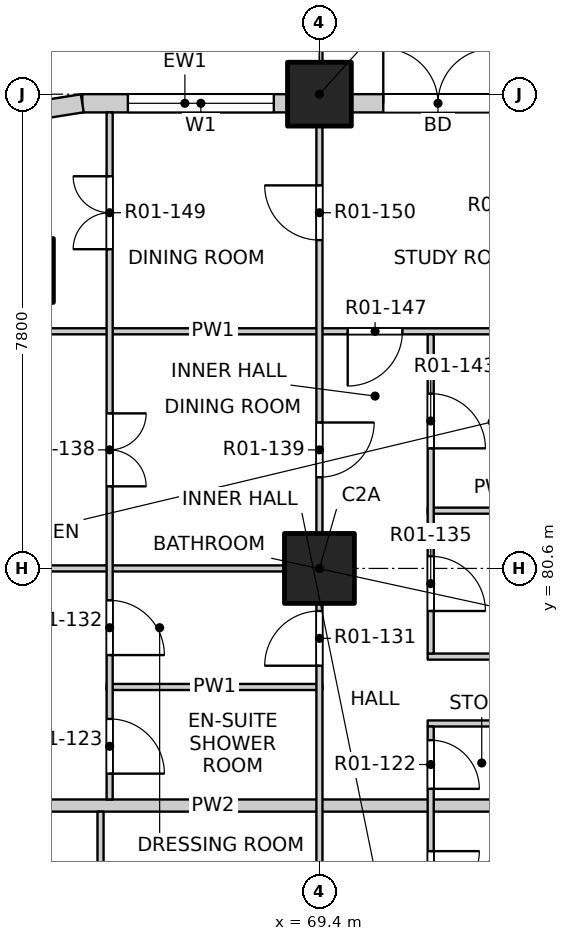
"""IFC4 building model, lengths in metres.
Left out: names, types, materials, properties, quantities, classifications, styles, units other than length and angle.
Written with IfcOpenShell. Run it as: python <this file> out.ifc"""

import sys

from ifc_helpers import new_model, si_unit, direction, frame, frame_2d, origin, origin_2d, place, context, subcontext, project, spatial, rectangle, extrude, element, fill, save


model = new_model("IFC4")
c1 = context("Model", 3, precision=1e-05, world=origin(), true_north=direction((0.0, 1.0)))
c2 = subcontext(c1, "Body", "Model", "MODEL_VIEW")
j1 = project(units=[si_unit("LENGTHUNIT", "METRE"), si_unit("PLANEANGLEUNIT", "RADIAN")], contexts=[c1])
p1 = place(None, origin())
s1 = spatial("IfcSite", under=j1, at=p1, CompositionType="ELEMENT")
p2 = place(p1, origin())
s2 = spatial("IfcBuilding", under=s1, at=p2, CompositionType="ELEMENT")
p3 = place(p2, frame((0.0, 0.0, 19.5)))
s3 = spatial("IfcBuildingStorey", under=s2, at=p3, CompositionType="ELEMENT", Elevation=19.5)
for number, where, z_axis, x_axis in (
    (1, (64.5, 85.5, -0.25), (0.0, 0.0, 1.0), (1.0, 0.0, 0.0)),
    (2, (69.4, 88.4, -0.25), (0.0, 0.0, 1.0), (1.0, 0.0, 0.0)),
):
    element("IfcColumn", number, at=place(p3, frame(where, z_axis=z_axis, x_axis=x_axis)), inside=s3, PredefinedType="COLUMN", context=c2, shape_type="SweptSolid", body=[
        extrude(rectangle(XDim=1.05, YDim=1.05, at=origin_2d()), origin(), (0.0, 0.0, 1.0), 3.4),
    ])
p4 = place(p3, frame((69.4, 80.6, -0.25), z_axis=(0.0, 0.0, 1.0), x_axis=(1.0, 0.0, 0.0)))
e3 = element("IfcColumn", 3, at=p4, inside=s3, PredefinedType="COLUMN", context=c2, shape_type="SweptSolid", body=[
    extrude(rectangle(XDim=1.15, YDim=1.15, at=origin_2d()), origin(), (0.0, 0.0, 1.0), 3.4),
])
p5 = place(p3, frame((65.5, 88.25, 0.0), z_axis=(0.0, 0.0, 1.0), x_axis=(1.0, 0.0, 0.0)))
e4 = element("IfcWall", 4, at=p5, inside=s3, PredefinedType="SOLIDWALL", context=c2, shape_type="SweptSolid", body=[
    extrude(rectangle(XDim=3.375, YDim=0.3, at=frame_2d((1.688, 0.0))), origin(), (0.0, 0.0, 1.0), 2.7),
])
p6 = place(p5, frame((0.75, 0.0, 0.9)))
e5 = element("IfcOpeningElement", 5, at=p6, cuts=e4, PredefinedType="OPENING", context=c2, shape_type="SweptSolid", body=[
    extrude(rectangle(XDim=2.4, YDim=1.8, at=frame_2d((1.2, 0.9))), frame((0.0, 0.16, 0.0), z_axis=(0.0, -1.0, 0.0), x_axis=(1.0, 0.0, 0.0)), (0.0, 0.0, 1.0), 0.32),
])
p7 = place(p3, frame((69.925, 88.25, 0.0), z_axis=(0.0, 0.0, 1.0), x_axis=(1.0, 0.0, 0.0)))
e6 = element("IfcWall", 6, at=p7, inside=s3, PredefinedType="SOLIDWALL", context=c2, shape_type="SweptSolid", body=[
    extrude(rectangle(XDim=6.75, YDim=0.3, at=frame_2d((3.375, 0.0))), origin(), (0.0, 0.0, 1.0), 2.7),
])
p8 = place(p7, frame((0.525, 0.0, 0.0)))
e7 = element("IfcOpeningElement", 7, at=p8, cuts=e6, PredefinedType="OPENING", context=c2, shape_type="SweptSolid", body=[
    extrude(rectangle(XDim=1.8, YDim=2.4, at=frame_2d((0.9, 1.2))), frame((0.0, 0.16, 0.0), z_axis=(0.0, -1.0, 0.0), x_axis=(1.0, 0.0, 0.0)), (0.0, 0.0, 1.0), 0.32),
])
p9 = place(p7, frame((4.125, 0.0, 0.9)))
e8 = element("IfcOpeningElement", 8, at=p9, cuts=e6, PredefinedType="OPENING", context=c2, shape_type="SweptSolid", body=[
    extrude(rectangle(XDim=2.4, YDim=1.8, at=frame_2d((1.2, 0.9))), frame((0.0, 0.16, 0.0), z_axis=(0.0, -1.0, 0.0), x_axis=(1.0, 0.0, 0.0)), (0.0, 0.0, 1.0), 0.32),
])
p10 = place(p3, frame((65.5, 88.25, 0.0), z_axis=(0.0, 0.0, 1.0), x_axis=(-0.987678452879, -0.156496880861, 0.0)))
e9 = element("IfcWall", 9, at=p10, inside=s3, PredefinedType="SOLIDWALL", context=c2, shape_type="SweptSolid", body=[
    extrude(rectangle(XDim=1.173, YDim=0.3, at=frame_2d((0.586, 0.0))), origin(), (0.0, 0.0, 1.0), 2.7),
])
p11 = place(p3, frame((61.9, 76.7, 0.0), z_axis=(0.0, 0.0, 1.0), x_axis=(1.0, 0.0, 0.0)))
e10 = element("IfcWall", 10, at=p11, inside=s3, PredefinedType="PARTITIONING", context=c2, shape_type="SweptSolid", body=[
    extrude(rectangle(XDim=11.5, YDim=0.2, at=frame_2d((5.75, 0.0))), origin(), (0.0, 0.0, 1.0), 3.15),
])
p12 = place(p3, frame((71.18, 78.05, 0.0), z_axis=(0.0, 0.0, 1.0), x_axis=(1.0, 0.0, 0.0)))
e11 = element("IfcWall", 11, at=p12, inside=s3, PredefinedType="PARTITIONING", context=c2, shape_type="SweptSolid", body=[
    extrude(rectangle(XDim=2.22, YDim=0.1, at=frame_2d((1.11, 0.0))), origin(), (0.0, 0.0, 1.0), 3.15),
])
p13 = place(p3, frame((65.9, 78.65, 0.0), z_axis=(0.0, 0.0, 1.0), x_axis=(1.0, 0.0, 0.0)))
e12 = element("IfcWall", 12, at=p13, inside=s3, PredefinedType="PARTITIONING", context=c2, shape_type="SweptSolid", body=[
    extrude(rectangle(XDim=3.55, YDim=0.1, at=frame_2d((1.775, 0.0))), origin(), (0.0, 0.0, 1.0), 3.15),
])
p14 = place(p3, frame((71.18, 79.15, 0.0), z_axis=(0.0, 0.0, 1.0), x_axis=(1.0, 0.0, 0.0)))
e13 = element("IfcWall", 13, at=p14, inside=s3, PredefinedType="PARTITIONING", context=c2, shape_type="SweptSolid", body=[
    extrude(rectangle(XDim=2.22, YDim=0.1, at=frame_2d((1.11, 0.0))), origin(), (0.0, 0.0, 1.0), 3.15),
])
p15 = place(p3, frame((61.9, 80.6, 0.0), z_axis=(0.0, 0.0, 1.0), x_axis=(1.0, 0.0, 0.0)))
e14 = element("IfcWall", 14, at=p15, inside=s3, PredefinedType="PARTITIONING", context=c2, shape_type="SweptSolid", body=[
    extrude(rectangle(XDim=7.55, YDim=0.1, at=frame_2d((3.775, 0.0))), origin(), (0.0, 0.0, 1.0), 2.55),
])
p16 = place(p3, frame((71.18, 81.55, 0.0), z_axis=(0.0, 0.0, 1.0), x_axis=(1.0, 0.0, 0.0)))
e15 = element("IfcWall", 15, at=p16, inside=s3, PredefinedType="PARTITIONING", context=c2, shape_type="SweptSolid", body=[
    extrude(rectangle(XDim=2.22, YDim=0.1, at=frame_2d((1.11, 0.0))), origin(), (0.0, 0.0, 1.0), 3.15),
])
p17 = place(p3, frame((61.9, 84.5, 0.0), z_axis=(0.0, 0.0, 1.0), x_axis=(1.0, 0.0, 0.0)))
e16 = element("IfcWall", 16, at=p17, inside=s3, PredefinedType="PARTITIONING", context=c2, shape_type="SweptSolid", body=[
    extrude(rectangle(XDim=11.5, YDim=0.1, at=frame_2d((5.75, 0.0))), origin(), (0.0, 0.0, 1.0), 3.15),
])
p18 = place(p17, frame((7.965, 0.0, 0.0)))
e17 = element("IfcOpeningElement", 17, at=p18, cuts=e16, PredefinedType="OPENING", context=c2, shape_type="SweptSolid", body=[
    extrude(rectangle(XDim=0.9, YDim=2.1, at=frame_2d((0.45, 1.05))), frame((0.0, 0.06, 0.0), z_axis=(0.0, -1.0, 0.0), x_axis=(1.0, 0.0, 0.0)), (0.0, 0.0, 1.0), 0.12),
])
p19 = place(p3, frame((65.8, 69.0, 0.0), z_axis=(0.0, 0.0, 1.0), x_axis=(0.0, 1.0, 0.0)))
e18 = element("IfcWall", 18, at=p19, inside=s3, PredefinedType="PARTITIONING", context=c2, shape_type="SweptSolid", body=[
    extrude(rectangle(XDim=7.6, YDim=0.1, at=frame_2d((3.8, 0.0))), origin(), (0.0, 0.0, 1.0), 3.15),
])
p20 = place(p19, frame((0.425, 0.0, 0.0)))
e19 = element("IfcOpeningElement", 19, at=p20, cuts=e18, PredefinedType="OPENING", context=c2, shape_type="SweptSolid", body=[
    extrude(rectangle(XDim=0.9, YDim=2.1, at=frame_2d((0.45, 1.05))), frame((0.0, 0.06, 0.0), z_axis=(0.0, -1.0, 0.0), x_axis=(1.0, 0.0, 0.0)), (0.0, 0.0, 1.0), 0.12),
])
p21 = place(p19, frame((2.375, 0.0, 0.0)))
e20 = element("IfcOpeningElement", 20, at=p21, cuts=e18, PredefinedType="OPENING", context=c2, shape_type="SweptSolid", body=[
    extrude(rectangle(XDim=0.9, YDim=2.1, at=frame_2d((0.45, 1.05))), frame((0.0, 0.06, 0.0), z_axis=(0.0, -1.0, 0.0), x_axis=(1.0, 0.0, 0.0)), (0.0, 0.0, 1.0), 0.12),
])
p22 = place(p19, frame((5.15, 0.0, 0.0)))
e21 = element("IfcOpeningElement", 21, at=p22, cuts=e18, PredefinedType="OPENING", context=c2, shape_type="SweptSolid", body=[
    extrude(rectangle(XDim=1.2, YDim=2.1, at=frame_2d((0.6, 1.05))), frame((0.0, 0.06, 0.0), z_axis=(0.0, -1.0, 0.0), x_axis=(1.0, 0.0, 0.0)), (0.0, 0.0, 1.0), 0.12),
])
p23 = place(p3, frame((65.95, 76.8, 0.0), z_axis=(0.0, 0.0, 1.0), x_axis=(0.0, 1.0, 0.0)))
e22 = element("IfcWall", 22, at=p23, inside=s3, PredefinedType="PARTITIONING", context=c2, shape_type="SweptSolid", body=[
    extrude(rectangle(XDim=11.3, YDim=0.1, at=frame_2d((5.65, 0.0))), origin(), (0.0, 0.0, 1.0), 3.15),
])
p24 = place(p23, frame((0.425, 0.0, 0.0)))
e23 = element("IfcOpeningElement", 23, at=p24, cuts=e22, PredefinedType="OPENING", context=c2, shape_type="SweptSolid", body=[
    extrude(rectangle(XDim=0.9, YDim=2.1, at=frame_2d((0.45, 1.05))), frame((0.0, 0.06, 0.0), z_axis=(0.0, -1.0, 0.0), x_axis=(1.0, 0.0, 0.0)), (0.0, 0.0, 1.0), 0.12),
])
p25 = place(p23, frame((2.375, 0.0, 0.0)))
e24 = element("IfcOpeningElement", 24, at=p25, cuts=e22, PredefinedType="OPENING", context=c2, shape_type="SweptSolid", body=[
    extrude(rectangle(XDim=0.9, YDim=2.1, at=frame_2d((0.45, 1.05))), frame((0.0, 0.06, 0.0), z_axis=(0.0, -1.0, 0.0), x_axis=(1.0, 0.0, 0.0)), (0.0, 0.0, 1.0), 0.12),
])
p26 = place(p23, frame((5.15, 0.0, 0.0)))
e25 = element("IfcOpeningElement", 25, at=p26, cuts=e22, PredefinedType="OPENING", context=c2, shape_type="SweptSolid", body=[
    extrude(rectangle(XDim=1.2, YDim=2.1, at=frame_2d((0.6, 1.05))), frame((0.0, 0.06, 0.0), z_axis=(0.0, -1.0, 0.0), x_axis=(1.0, 0.0, 0.0)), (0.0, 0.0, 1.0), 0.12),
])
p27 = place(p23, frame((9.05, 0.0, 0.0)))
e26 = element("IfcOpeningElement", 26, at=p27, cuts=e22, PredefinedType="OPENING", context=c2, shape_type="SweptSolid", body=[
    extrude(rectangle(XDim=1.2, YDim=2.1, at=frame_2d((0.6, 1.05))), frame((0.0, 0.06, 0.0), z_axis=(0.0, -1.0, 0.0), x_axis=(1.0, 0.0, 0.0)), (0.0, 0.0, 1.0), 0.12),
])
p28 = place(p3, frame((69.4, 49.4, 0.0), z_axis=(0.0, 0.0, 1.0), x_axis=(0.0, 1.0, 0.0)))
e27 = element("IfcWall", 27, at=p28, inside=s3, PredefinedType="PARTITIONING", context=c2, shape_type="SweptSolid", body=[
    extrude(rectangle(XDim=31.2, YDim=0.1, at=frame_2d((15.6, 0.0))), origin(), (0.0, 0.0, 1.0), 3.15),
])
p29 = place(p28, frame((1.5, 0.0, 0.0)))
e28 = element("IfcOpeningElement", 28, at=p29, cuts=e27, PredefinedType="OPENING", context=c2, shape_type="SweptSolid", body=[
    extrude(rectangle(XDim=0.9, YDim=2.1, at=frame_2d((0.45, 1.05))), frame((0.0, 0.06, 0.0), z_axis=(0.0, -1.0, 0.0), x_axis=(1.0, 0.0, 0.0)), (0.0, 0.0, 1.0), 0.12),
])
p30 = place(p28, frame((6.225, 0.0, 0.0)))
e29 = element("IfcOpeningElement", 29, at=p30, cuts=e27, PredefinedType="OPENING", context=c2, shape_type="SweptSolid", body=[
    extrude(rectangle(XDim=0.9, YDim=2.1, at=frame_2d((0.45, 1.05))), frame((0.0, 0.06, 0.0), z_axis=(0.0, -1.0, 0.0), x_axis=(1.0, 0.0, 0.0)), (0.0, 0.0, 1.0), 0.12),
])
p31 = place(p28, frame((10.275, 0.0, 0.0)))
e30 = element("IfcOpeningElement", 30, at=p31, cuts=e27, PredefinedType="OPENING", context=c2, shape_type="SweptSolid", body=[
    extrude(rectangle(XDim=0.9, YDim=2.1, at=frame_2d((0.45, 1.05))), frame((0.0, 0.06, 0.0), z_axis=(0.0, -1.0, 0.0), x_axis=(1.0, 0.0, 0.0)), (0.0, 0.0, 1.0), 0.12),
])
p32 = place(p28, frame((13.2, 0.0, 0.0)))
e31 = element("IfcOpeningElement", 31, at=p32, cuts=e27, PredefinedType="OPENING", context=c2, shape_type="SweptSolid", body=[
    extrude(rectangle(XDim=0.9, YDim=2.1, at=frame_2d((0.45, 1.05))), frame((0.0, 0.06, 0.0), z_axis=(0.0, -1.0, 0.0), x_axis=(1.0, 0.0, 0.0)), (0.0, 0.0, 1.0), 0.12),
])
p33 = place(p28, frame((18.075, 0.0, 0.0)))
e32 = element("IfcOpeningElement", 32, at=p33, cuts=e27, PredefinedType="OPENING", context=c2, shape_type="SweptSolid", body=[
    extrude(rectangle(XDim=0.9, YDim=2.1, at=frame_2d((0.45, 1.05))), frame((0.0, 0.06, 0.0), z_axis=(0.0, -1.0, 0.0), x_axis=(1.0, 0.0, 0.0)), (0.0, 0.0, 1.0), 0.12),
])
p34 = place(p28, frame((21.8, 0.0, 0.0)))
e33 = element("IfcOpeningElement", 33, at=p34, cuts=e27, PredefinedType="OPENING", context=c2, shape_type="SweptSolid", body=[
    extrude(rectangle(XDim=0.9, YDim=2.1, at=frame_2d((0.45, 1.05))), frame((0.0, 0.06, 0.0), z_axis=(0.0, -1.0, 0.0), x_axis=(1.0, 0.0, 0.0)), (0.0, 0.0, 1.0), 0.12),
])
p35 = place(p28, frame((24.9, 0.0, 0.0)))
e34 = element("IfcOpeningElement", 34, at=p35, cuts=e27, PredefinedType="OPENING", context=c2, shape_type="SweptSolid", body=[
    extrude(rectangle(XDim=0.9, YDim=2.1, at=frame_2d((0.45, 1.05))), frame((0.0, 0.06, 0.0), z_axis=(0.0, -1.0, 0.0), x_axis=(1.0, 0.0, 0.0)), (0.0, 0.0, 1.0), 0.12),
])
p36 = place(p28, frame((29.6, 0.0, 0.0)))
e35 = element("IfcOpeningElement", 35, at=p36, cuts=e27, PredefinedType="OPENING", context=c2, shape_type="SweptSolid", body=[
    extrude(rectangle(XDim=0.9, YDim=2.1, at=frame_2d((0.45, 1.05))), frame((0.0, 0.06, 0.0), z_axis=(0.0, -1.0, 0.0), x_axis=(1.0, 0.0, 0.0)), (0.0, 0.0, 1.0), 0.12),
])
p37 = place(p3, frame((69.4, 80.6, 0.0), z_axis=(0.0, 0.0, 1.0), x_axis=(0.0, 1.0, 0.0)))
e36 = element("IfcWall", 36, at=p37, inside=s3, PredefinedType="PARTITIONING", context=c2, shape_type="SweptSolid", body=[
    extrude(rectangle(XDim=7.5, YDim=0.1, at=frame_2d((3.75, 0.0))), origin(), (0.0, 0.0, 1.0), 2.55),
])
p38 = place(p37, frame((1.5, 0.0, 0.0)))
e37 = element("IfcOpeningElement", 37, at=p38, cuts=e36, PredefinedType="OPENING", context=c2, shape_type="SweptSolid", body=[
    extrude(rectangle(XDim=0.9, YDim=2.1, at=frame_2d((0.45, 1.05))), frame((0.0, 0.06, 0.0), z_axis=(0.0, -1.0, 0.0), x_axis=(1.0, 0.0, 0.0)), (0.0, 0.0, 1.0), 0.12),
])
p39 = place(p37, frame((5.4, 0.0, 0.0)))
e38 = element("IfcOpeningElement", 38, at=p39, cuts=e36, PredefinedType="OPENING", context=c2, shape_type="SweptSolid", body=[
    extrude(rectangle(XDim=0.9, YDim=2.1, at=frame_2d((0.45, 1.05))), frame((0.0, 0.06, 0.0), z_axis=(0.0, -1.0, 0.0), x_axis=(1.0, 0.0, 0.0)), (0.0, 0.0, 1.0), 0.12),
])
p40 = place(p3, frame((71.23, 71.5, 0.0), z_axis=(0.0, 0.0, 1.0), x_axis=(0.0, 1.0, 0.0)))
e39 = element("IfcWall", 39, at=p40, inside=s3, PredefinedType="PARTITIONING", context=c2, shape_type="SweptSolid", body=[
    extrude(rectangle(XDim=6.5, YDim=0.1, at=frame_2d((3.25, 0.0))), origin(), (0.0, 0.0, 1.0), 3.15),
])
p41 = place(p40, frame((0.975, 0.0, 0.0)))
e40 = element("IfcOpeningElement", 40, at=p41, cuts=e39, PredefinedType="OPENING", context=c2, shape_type="SweptSolid", body=[
    extrude(rectangle(XDim=0.9, YDim=2.1, at=frame_2d((0.45, 1.05))), frame((0.0, 0.06, 0.0), z_axis=(0.0, -1.0, 0.0), x_axis=(1.0, 0.0, 0.0)), (0.0, 0.0, 1.0), 0.12),
])
p42 = place(p40, frame((3.65, 0.0, 0.0)))
e41 = element("IfcOpeningElement", 41, at=p42, cuts=e39, PredefinedType="OPENING", context=c2, shape_type="SweptSolid", body=[
    extrude(rectangle(XDim=0.8, YDim=2.1, at=frame_2d((0.4, 1.05))), frame((0.0, 0.06, 0.0), z_axis=(0.0, -1.0, 0.0), x_axis=(1.0, 0.0, 0.0)), (0.0, 0.0, 1.0), 0.12),
])
p43 = place(p40, frame((5.475, 0.0, 0.0)))
e42 = element("IfcOpeningElement", 42, at=p43, cuts=e39, PredefinedType="OPENING", context=c2, shape_type="SweptSolid", body=[
    extrude(rectangle(XDim=0.8, YDim=2.1, at=frame_2d((0.4, 1.05))), frame((0.0, 0.06, 0.0), z_axis=(0.0, -1.0, 0.0), x_axis=(1.0, 0.0, 0.0)), (0.0, 0.0, 1.0), 0.12),
])
p44 = place(p3, frame((71.23, 79.2, 0.0), z_axis=(0.0, 0.0, 1.0), x_axis=(0.0, 1.0, 0.0)))
e43 = element("IfcWall", 43, at=p44, inside=s3, PredefinedType="PARTITIONING", context=c2, shape_type="SweptSolid", body=[
    extrude(rectangle(XDim=5.25, YDim=0.1, at=frame_2d((2.625, 0.0))), origin(), (0.0, 0.0, 1.0), 3.15),
])
p45 = place(p44, frame((0.7, 0.0, 0.0)))
e44 = element("IfcOpeningElement", 44, at=p45, cuts=e43, PredefinedType="OPENING", context=c2, shape_type="SweptSolid", body=[
    extrude(rectangle(XDim=0.9, YDim=2.1, at=frame_2d((0.45, 1.05))), frame((0.0, 0.06, 0.0), z_axis=(0.0, -1.0, 0.0), x_axis=(1.0, 0.0, 0.0)), (0.0, 0.0, 1.0), 0.12),
])
p46 = place(p44, frame((3.375, 0.0, 0.0)))
e45 = element("IfcOpeningElement", 45, at=p46, cuts=e43, PredefinedType="OPENING", context=c2, shape_type="SweptSolid", body=[
    extrude(rectangle(XDim=0.9, YDim=2.1, at=frame_2d((0.45, 1.05))), frame((0.0, 0.06, 0.0), z_axis=(0.0, -1.0, 0.0), x_axis=(1.0, 0.0, 0.0)), (0.0, 0.0, 1.0), 0.12),
])
p47 = place(p6, origin())
e46 = element("IfcWindow", 46, at=p47, inside=s3, PartitioningType="DOUBLE_PANEL_VERTICAL", PredefinedType="WINDOW", context=c2, shape_type="SweptSolid", body=[
    extrude(rectangle(XDim=2.4, YDim=1.8, at=frame_2d((1.2, 0.9))), frame((0.0, 0.03, 0.0), z_axis=(0.0, -1.0, 0.0), x_axis=(1.0, 0.0, 0.0)), (0.0, 0.0, 1.0), 0.06),
])
fill(e5, e46)
p48 = place(p8, origin())
e47 = element("IfcDoor", 47, at=p48, inside=s3, OperationType="DOUBLE_DOOR_SINGLE_SWING", PredefinedType="DOOR", context=c2, shape_type="SweptSolid", body=[
    extrude(rectangle(XDim=1.8, YDim=2.4, at=frame_2d((0.9, 1.2))), frame((0.0, 0.025, 0.0), z_axis=(0.0, -1.0, 0.0), x_axis=(1.0, 0.0, 0.0)), (0.0, 0.0, 1.0), 0.05),
])
fill(e7, e47)
p49 = place(p42, origin())
e48 = element("IfcDoor", 48, at=p49, inside=s3, OperationType="SINGLE_SWING_LEFT", PredefinedType="DOOR", context=c2, shape_type="SweptSolid", body=[
    extrude(rectangle(XDim=0.8, YDim=2.1, at=frame_2d((0.4, 1.05))), frame((0.0, 0.025, 0.0), z_axis=(0.0, -1.0, 0.0), x_axis=(1.0, 0.0, 0.0)), (0.0, 0.0, 1.0), 0.05),
])
fill(e41, e48)
p50 = place(p43, origin())
e49 = element("IfcDoor", 49, at=p50, inside=s3, OperationType="SINGLE_SWING_RIGHT", PredefinedType="DOOR", context=c2, shape_type="SweptSolid", body=[
    extrude(rectangle(XDim=0.8, YDim=2.1, at=frame_2d((0.4, 1.05))), frame((0.0, 0.025, 0.0), z_axis=(0.0, -1.0, 0.0), x_axis=(1.0, 0.0, 0.0)), (0.0, 0.0, 1.0), 0.05),
])
fill(e42, e49)
p51 = place(p24, origin())
e50 = element("IfcDoor", 50, at=p51, inside=s3, OperationType="SINGLE_SWING_RIGHT", PredefinedType="DOOR", context=c2, shape_type="SweptSolid", body=[
    extrude(rectangle(XDim=0.9, YDim=2.1, at=frame_2d((0.45, 1.05))), frame((0.0, 0.025, 0.0), z_axis=(0.0, -1.0, 0.0), x_axis=(1.0, 0.0, 0.0)), (0.0, 0.0, 1.0), 0.05),
])
fill(e23, e50)
p52 = place(p36, origin())
e51 = element("IfcDoor", 51, at=p52, inside=s3, OperationType="SINGLE_SWING_LEFT", PredefinedType="DOOR", context=c2, shape_type="SweptSolid", body=[
    extrude(rectangle(XDim=0.9, YDim=2.1, at=frame_2d((0.45, 1.05))), frame((0.0, 0.025, 0.0), z_axis=(0.0, -1.0, 0.0), x_axis=(1.0, 0.0, 0.0)), (0.0, 0.0, 1.0), 0.05),
])
fill(e35, e51)
p53 = place(p25, origin())
e52 = element("IfcDoor", 52, at=p53, inside=s3, OperationType="SINGLE_SWING_RIGHT", PredefinedType="DOOR", context=c2, shape_type="SweptSolid", body=[
    extrude(rectangle(XDim=0.9, YDim=2.1, at=frame_2d((0.45, 1.05))), frame((0.0, 0.025, 0.0), z_axis=(0.0, -1.0, 0.0), x_axis=(1.0, 0.0, 0.0)), (0.0, 0.0, 1.0), 0.05),
])
fill(e24, e52)
p54 = place(p45, origin())
e53 = element("IfcDoor", 53, at=p54, inside=s3, OperationType="SINGLE_SWING_RIGHT", PredefinedType="DOOR", context=c2, shape_type="SweptSolid", body=[
    extrude(rectangle(XDim=0.9, YDim=2.1, at=frame_2d((0.45, 1.05))), frame((0.0, 0.025, 0.0), z_axis=(0.0, -1.0, 0.0), x_axis=(1.0, 0.0, 0.0)), (0.0, 0.0, 1.0), 0.05),
])
fill(e44, e53)
p55 = place(p26, origin())
e54 = element("IfcDoor", 54, at=p55, inside=s3, OperationType="DOUBLE_DOOR_SINGLE_SWING", PredefinedType="DOOR", context=c2, shape_type="SweptSolid", body=[
    extrude(rectangle(XDim=1.2, YDim=2.1, at=frame_2d((0.6, 1.05))), frame((0.0, 0.025, 0.0), z_axis=(0.0, -1.0, 0.0), x_axis=(1.0, 0.0, 0.0)), (0.0, 0.0, 1.0), 0.05),
])
fill(e25, e54)
p56 = place(p38, origin())
e55 = element("IfcDoor", 55, at=p56, inside=s3, OperationType="SINGLE_SWING_LEFT", PredefinedType="DOOR", context=c2, shape_type="SweptSolid", body=[
    extrude(rectangle(XDim=0.9, YDim=2.1, at=frame_2d((0.45, 1.05))), frame((0.0, 0.025, 0.0), z_axis=(0.0, -1.0, 0.0), x_axis=(1.0, 0.0, 0.0)), (0.0, 0.0, 1.0), 0.05),
])
fill(e37, e55)
p57 = place(p46, origin())
e56 = element("IfcDoor", 56, at=p57, inside=s3, OperationType="SINGLE_SWING_RIGHT", PredefinedType="DOOR", context=c2, shape_type="SweptSolid", body=[
    extrude(rectangle(XDim=0.9, YDim=2.1, at=frame_2d((0.45, 1.05))), frame((0.0, 0.025, 0.0), z_axis=(0.0, -1.0, 0.0), x_axis=(1.0, 0.0, 0.0)), (0.0, 0.0, 1.0), 0.05),
])
fill(e45, e56)
p58 = place(p18, origin())
e57 = element("IfcDoor", 57, at=p58, inside=s3, OperationType="SINGLE_SWING_RIGHT", PredefinedType="DOOR", context=c2, shape_type="SweptSolid", body=[
    extrude(rectangle(XDim=0.9, YDim=2.1, at=frame_2d((0.45, 1.05))), frame((0.0, 0.025, 0.0), z_axis=(0.0, -1.0, 0.0), x_axis=(1.0, 0.0, 0.0)), (0.0, 0.0, 1.0), 0.05),
])
fill(e17, e57)
p59 = place(p27, origin())
e58 = element("IfcDoor", 58, at=p59, inside=s3, OperationType="DOUBLE_DOOR_SINGLE_SWING", PredefinedType="DOOR", context=c2, shape_type="SweptSolid", body=[
    extrude(rectangle(XDim=1.2, YDim=2.1, at=frame_2d((0.6, 1.05))), frame((0.0, 0.025, 0.0), z_axis=(0.0, -1.0, 0.0), x_axis=(1.0, 0.0, 0.0)), (0.0, 0.0, 1.0), 0.05),
])
fill(e26, e58)
p60 = place(p39, origin())
e59 = element("IfcDoor", 59, at=p60, inside=s3, OperationType="SINGLE_SWING_RIGHT", PredefinedType="DOOR", context=c2, shape_type="SweptSolid", body=[
    extrude(rectangle(XDim=0.9, YDim=2.1, at=frame_2d((0.45, 1.05))), frame((0.0, 0.025, 0.0), z_axis=(0.0, -1.0, 0.0), x_axis=(1.0, 0.0, 0.0)), (0.0, 0.0, 1.0), 0.05),
])
fill(e38, e59)
save(model, sys.argv[1])
